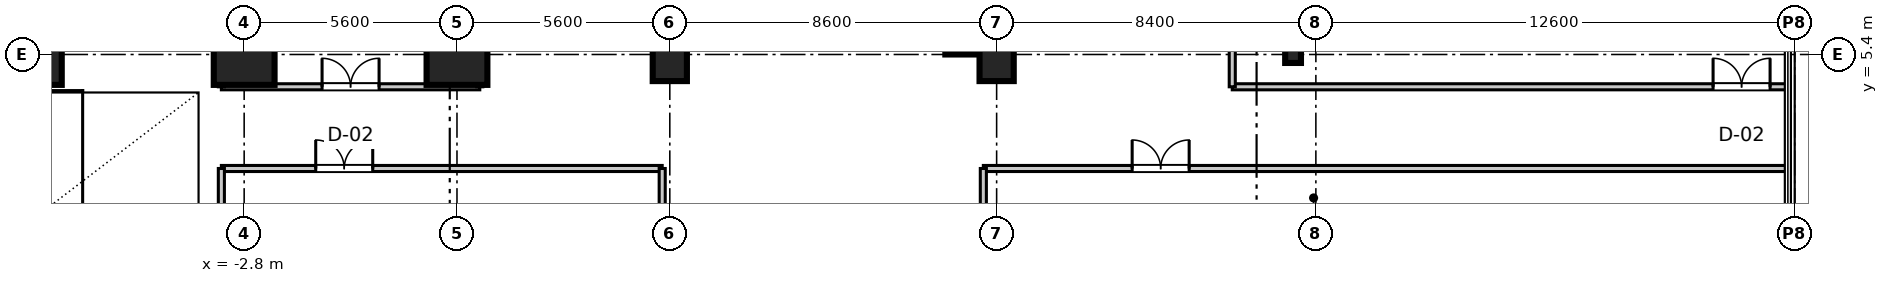
"""IFC4 building model, lengths in metres.
Left out: names, types, materials, properties, quantities, classifications, styles, units other than length and angle.
Written with IfcOpenShell. Run it as: python <this file> out.ifc"""

import sys

from ifc_helpers import new_model, si_unit, direction, frame, frame_2d, origin, origin_2d, place, context, subcontext, project, spatial, rectangle, i_section, extrude, source, transform, mapped, element, fill, save


model = new_model("IFC4")
c1 = context("Model", 3, precision=1e-05, world=origin(), true_north=direction((0.0, 1.0)))
c2 = subcontext(c1, "Body", "Model", "MODEL_VIEW")
j1 = project(units=[si_unit("LENGTHUNIT", "METRE"), si_unit("PLANEANGLEUNIT", "RADIAN")], contexts=[c1])
p1 = place(None, origin())
s1 = spatial("IfcSite", under=j1, at=p1, CompositionType="ELEMENT")
p2 = place(p1, origin())
s2 = spatial("IfcBuilding", under=s1, at=p2, CompositionType="ELEMENT")
p3 = place(p2, frame((0.0, 0.0, 5.4)))
s3 = spatial("IfcBuildingStorey", under=s2, at=p3, CompositionType="ELEMENT", Elevation=5.4)
m1 = source(origin(), c2, "Body", "SweptSolid", [
    extrude(rectangle(XDim=1.6, YDim=1.6, at=origin_2d()), origin(), (0.0, 0.0, 1.0), 5.355),
])
for number, where, z_axis, x_axis in (
    (1, (-8.4, 5.4, 0.0), (0.0, 0.0, 1.0), (1.0, 0.0, 0.0)),
    (2, (-2.8, 5.4, 0.0), (0.0, 0.0, 1.0), (1.0, 0.0, 0.0)),
    (3, (2.8, 5.4, 0.0), (0.0, 0.0, 1.0), (1.0, 0.0, 0.0)),
):
    element("IfcColumn", number, at=place(p3, frame(where, z_axis=z_axis, x_axis=x_axis)), inside=s3, PredefinedType="COLUMN", context=c2, shape_type="MappedRepresentation", body=[
        mapped(m1, transform((0.0, 0.0, 0.0), scale=1.0)),
    ])
m2 = source(origin(), c2, "Body", "SweptSolid", [
    extrude(rectangle(XDim=0.9, YDim=1.4, at=origin_2d()), origin(), (0.0, 0.0, 1.0), 5.355),
])
for number, where, z_axis, x_axis in (
    (4, (8.4, 5.4, 0.0), (0.0, 0.0, 1.0), (1.0, 0.0, 0.0)),
    (5, (17.0, 5.4, 0.0), (0.0, 0.0, 1.0), (1.0, 0.0, 0.0)),
):
    element("IfcColumn", number, at=place(p3, frame(where, z_axis=z_axis, x_axis=x_axis)), inside=s3, PredefinedType="PILASTER", context=c2, shape_type="MappedRepresentation", body=[
        mapped(m2, transform((0.0, 0.0, 0.0), scale=1.0)),
    ])
m3 = source(origin(), c2, "Body", "SweptSolid", [
    extrude(i_section(OverallWidth=0.416, OverallDepth=0.446, WebThickness=0.025, FlangeThickness=0.04, at=origin_2d()), origin(), (0.0, 0.0, 1.0), 5.355),
])
p4 = place(p3, frame((24.8, 5.4, 0.0), z_axis=(0.0, 0.0, 1.0), x_axis=(1.0, 0.0, 0.0)))
e6 = element("IfcColumn", 6, at=p4, inside=s3, PredefinedType="COLUMN", context=c2, shape_type="MappedRepresentation", body=[
    mapped(m3, transform((0.0, 0.0, 0.0), scale=1.0)),
])
m4 = source(origin(), c2, "Body", "SweptSolid", [
    extrude(rectangle(XDim=11.6, YDim=0.8, at=frame_2d((5.8, 0.0))), origin(), (0.0, 0.0, 1.0), 5.08),
])
p5 = place(p3, frame((16.05, 5.4, 0.0), z_axis=(0.0, 0.0, 1.0), x_axis=(0.0, 1.0, 0.0)))
e7 = element("IfcWall", 7, at=p5, inside=s3, PredefinedType="SHEAR", context=c2, shape_type="MappedRepresentation", body=[
    mapped(m4, transform((0.0, 0.0, 0.0), scale=1.0)),
])
m5 = source(origin(), c2, "Body", "SweptSolid", [
    extrude(rectangle(XDim=6.8, YDim=0.16, at=frame_2d((3.4, 0.0))), origin(), (0.0, 0.0, 1.0), 3.4),
])
p6 = place(p3, frame((-3.4, 4.55, 0.0), z_axis=(0.0, 0.0, 1.0), x_axis=(1.0, 0.0, 0.0)))
e8 = element("IfcWall", 8, at=p6, inside=s3, PredefinedType="PARTITIONING", context=c2, shape_type="MappedRepresentation", body=[
    mapped(m5, transform((0.0, 0.0, 0.0), scale=1.0)),
])
p7 = place(p6, frame((2.65, 0.0, 0.0)))
e9 = element("IfcOpeningElement", 9, at=p7, cuts=e8, PredefinedType="OPENING", context=c2, shape_type="SweptSolid", body=[
    extrude(rectangle(XDim=1.5, YDim=2.15, at=frame_2d((0.75, 1.075))), frame((0.0, 0.09, 0.0), z_axis=(0.0, -1.0, 0.0), x_axis=(1.0, 0.0, 0.0)), (0.0, 0.0, 1.0), 0.18),
])
m6 = source(origin(), c2, "Body", "SweptSolid", [
    extrude(rectangle(XDim=19.21, YDim=0.16, at=frame_2d((9.605, 0.0))), origin(), (0.0, 0.0, 1.0), 3.4),
])
for number, where, z_axis, x_axis in (
    (10, (-3.4, 4.55, 0.0), (0.0, 0.0, 1.0), (0.0, 1.0, 0.0)),
    (11, (3.4, 4.55, 0.0), (0.0, 0.0, 1.0), (0.0, 1.0, 0.0)),
):
    element("IfcWall", number, at=place(p3, frame(where, z_axis=z_axis, x_axis=x_axis)), inside=s3, PredefinedType="PARTITIONING", context=c2, shape_type="MappedRepresentation", body=[
        mapped(m6, transform((0.0, 0.0, 0.0), scale=1.0)),
    ])
m7 = source(origin(), c2, "Body", "SweptSolid", [
    extrude(rectangle(XDim=14.56, YDim=0.16, at=frame_2d((7.28, 0.0))), origin(), (0.0, 0.0, 1.0), 3.4),
])
p8 = place(p3, frame((23.2, 4.55, 0.0), z_axis=(0.0, 0.0, 1.0), x_axis=(1.0, 0.0, 0.0)))
e12 = element("IfcWall", 12, at=p8, inside=s3, PredefinedType="PARTITIONING", context=c2, shape_type="MappedRepresentation", body=[
    mapped(m7, transform((0.0, 0.0, 0.0), scale=1.0)),
])
p9 = place(p8, frame((12.652, 0.0, 0.0)))
e13 = element("IfcOpeningElement", 13, at=p9, cuts=e12, PredefinedType="OPENING", context=c2, shape_type="SweptSolid", body=[
    extrude(rectangle(XDim=1.5, YDim=2.15, at=frame_2d((0.75, 1.075))), frame((0.0, 0.09, 0.0), z_axis=(0.0, -1.0, 0.0), x_axis=(1.0, 0.0, 0.0)), (0.0, 0.0, 1.0), 0.18),
])
p10 = place(p3, frame((23.2, 4.55, 0.0), z_axis=(0.0, 0.0, 1.0), x_axis=(0.0, 1.0, 0.0)))
e14 = element("IfcWall", 14, at=p10, inside=s3, PredefinedType="PARTITIONING", context=c2, shape_type="MappedRepresentation", body=[
    mapped(m6, transform((0.0, 0.0, 0.0), scale=1.0)),
])
m8 = source(origin(), c2, "Body", "SweptSolid", [
    extrude(rectangle(XDim=11.6, YDim=0.16, at=frame_2d((5.8, 0.0))), origin(), (0.0, 0.0, 1.0), 3.4),
])
p11 = place(p3, frame((-3.4, 2.4, 0.0), z_axis=(0.0, 0.0, 1.0), x_axis=(1.0, 0.0, 0.0)))
e15 = element("IfcWall", 15, at=p11, inside=s3, PredefinedType="PARTITIONING", context=c2, shape_type="MappedRepresentation", body=[
    mapped(m8, transform((0.0, 0.0, 0.0), scale=1.0)),
])
p12 = place(p11, frame((2.483, 0.0, 0.0)))
e16 = element("IfcOpeningElement", 16, at=p12, cuts=e15, PredefinedType="OPENING", context=c2, shape_type="SweptSolid", body=[
    extrude(rectangle(XDim=1.5, YDim=2.15, at=frame_2d((0.75, 1.075))), frame((0.0, 0.09, 0.0), z_axis=(0.0, -1.0, 0.0), x_axis=(1.0, 0.0, 0.0)), (0.0, 0.0, 1.0), 0.18),
])
m9 = source(origin(), c2, "Body", "SweptSolid", [
    extrude(rectangle(XDim=4.8, YDim=0.16, at=frame_2d((2.4, 0.0))), origin(), (0.0, 0.0, 1.0), 3.4),
])
for number, where, z_axis, x_axis in (
    (17, (-3.4, -2.4, 0.0), (0.0, 0.0, 1.0), (0.0, 1.0, 0.0)),
    (18, (8.2, -2.4, 0.0), (0.0, 0.0, 1.0), (0.0, 1.0, 0.0)),
):
    element("IfcWall", number, at=place(p3, frame(where, z_axis=z_axis, x_axis=x_axis)), inside=s3, PredefinedType="PARTITIONING", context=c2, shape_type="MappedRepresentation", body=[
        mapped(m9, transform((0.0, 0.0, 0.0), scale=1.0)),
    ])
m10 = source(origin(), c2, "Body", "SweptSolid", [
    extrude(rectangle(XDim=21.11, YDim=0.16, at=frame_2d((10.555, 0.0))), origin(), (0.0, 0.0, 1.0), 3.4),
])
p13 = place(p3, frame((16.65, 2.4, 0.0), z_axis=(0.0, 0.0, 1.0), x_axis=(1.0, 0.0, 0.0)))
e19 = element("IfcWall", 19, at=p13, inside=s3, PredefinedType="PARTITIONING", context=c2, shape_type="MappedRepresentation", body=[
    mapped(m10, transform((0.0, 0.0, 0.0), scale=1.0)),
])
p14 = place(p13, frame((3.916, 0.0, 0.0)))
e20 = element("IfcOpeningElement", 20, at=p14, cuts=e19, PredefinedType="OPENING", context=c2, shape_type="SweptSolid", body=[
    extrude(rectangle(XDim=1.5, YDim=2.15, at=frame_2d((0.75, 1.075))), frame((0.0, 0.09, 0.0), z_axis=(0.0, -1.0, 0.0), x_axis=(1.0, 0.0, 0.0)), (0.0, 0.0, 1.0), 0.18),
])
p15 = place(p3, frame((16.65, -2.4, 0.0), z_axis=(0.0, 0.0, 1.0), x_axis=(0.0, 1.0, 0.0)))
e21 = element("IfcWall", 21, at=p15, inside=s3, PredefinedType="PARTITIONING", context=c2, shape_type="MappedRepresentation", body=[
    mapped(m9, transform((0.0, 0.0, 0.0), scale=1.0)),
])
m11 = source(origin(), c2, "Body", "SweptSolid", [
    extrude(rectangle(XDim=1.5, YDim=2.15, at=frame_2d((0.75, 1.075))), frame((0.0, 0.025, 0.0), z_axis=(0.0, -1.0, 0.0), x_axis=(1.0, 0.0, 0.0)), (0.0, 0.0, 1.0), 0.05),
])
p16 = place(p7, origin())
e22 = element("IfcDoor", 22, at=p16, inside=s3, OperationType="DOUBLE_DOOR_SINGLE_SWING", PredefinedType="DOOR", context=c2, shape_type="MappedRepresentation", body=[
    mapped(m11, transform((0.0, 0.0, 0.0), scale=1.0)),
])
fill(e9, e22)
p17 = place(p9, origin())
e23 = element("IfcDoor", 23, at=p17, inside=s3, OperationType="DOUBLE_DOOR_SINGLE_SWING", PredefinedType="DOOR", context=c2, shape_type="MappedRepresentation", body=[
    mapped(m11, transform((0.0, 0.0, 0.0), scale=1.0)),
])
fill(e13, e23)
p18 = place(p12, frame((1.5, 0.0, 0.0), z_axis=(0.0, 0.0, 1.0), x_axis=(-1.0, 0.0, 0.0)))
e24 = element("IfcDoor", 24, at=p18, inside=s3, OperationType="DOUBLE_DOOR_SINGLE_SWING", PredefinedType="DOOR", context=c2, shape_type="MappedRepresentation", body=[
    mapped(m11, transform((0.0, 0.0, 0.0), scale=1.0)),
])
fill(e16, e24)
p19 = place(p14, frame((1.5, 0.0, 0.0), z_axis=(0.0, 0.0, 1.0), x_axis=(-1.0, 0.0, 0.0)))
e25 = element("IfcDoor", 25, at=p19, inside=s3, OperationType="DOUBLE_DOOR_SINGLE_SWING", PredefinedType="DOOR", context=c2, shape_type="MappedRepresentation", body=[
    mapped(m11, transform((0.0, 0.0, 0.0), scale=1.0)),
])
fill(e20, e25)
save(model, sys.argv[1])
